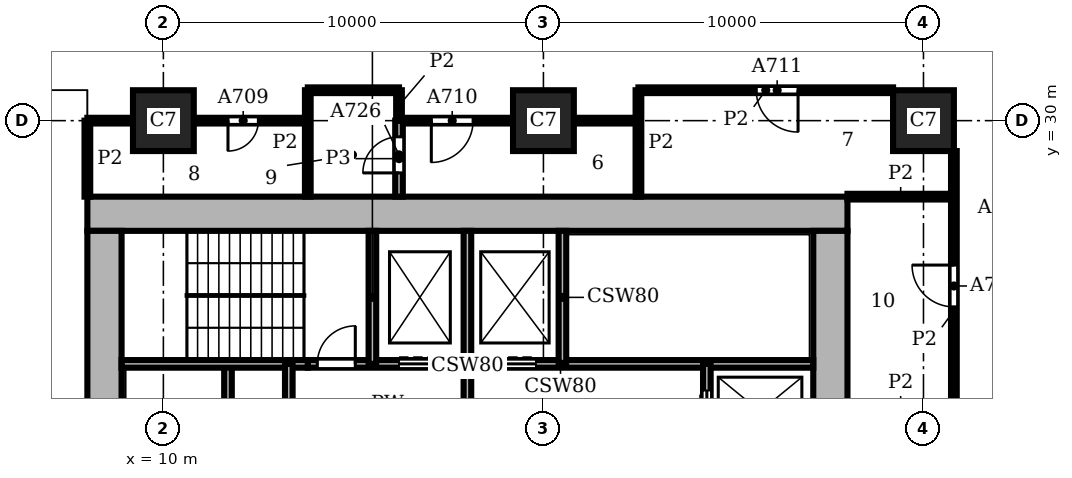
"""IFC4 building model, lengths in metres.
Left out: names, types, materials, properties, quantities, classifications, styles, units other than length and angle.
Written with IfcOpenShell. Run it as: python <this file> out.ifc"""

import sys

from ifc_helpers import new_model, si_unit, direction, frame, frame_2d, origin, origin_2d, place, context, subcontext, project, spatial, rectangle, extrude, element, fill, save


model = new_model("IFC4")
c1 = context("Model", 3, precision=1e-05, world=origin(), true_north=direction((0.0, 1.0)))
c2 = subcontext(c1, "Body", "Model", "MODEL_VIEW")
j1 = project(units=[si_unit("LENGTHUNIT", "METRE"), si_unit("PLANEANGLEUNIT", "RADIAN")], contexts=[c1])
p1 = place(None, origin())
s1 = spatial("IfcSite", under=j1, at=p1, CompositionType="ELEMENT")
p2 = place(p1, origin())
s2 = spatial("IfcBuilding", under=s1, at=p2, CompositionType="ELEMENT")
p3 = place(p2, frame((0.0, 0.0, 82.2)))
s3 = spatial("IfcBuildingStorey", under=s2, at=p3, CompositionType="ELEMENT", Elevation=82.2)
for number, where, z_axis, x_axis in (
    (1, (10.0, 30.0, 0.0), (0.0, 0.0, 1.0), (1.0, 0.0, 0.0)),
    (2, (20.0, 30.0, 0.0), (0.0, 0.0, 1.0), (1.0, 0.0, 0.0)),
    (3, (30.0, 30.0, 0.0), (0.0, 0.0, 1.0), (1.0, 0.0, 0.0)),
):
    element("IfcColumn", number, at=place(p3, frame(where, z_axis=z_axis, x_axis=x_axis)), inside=s3, PredefinedType="COLUMN", context=c2, shape_type="SweptSolid", body=[
        extrude(rectangle(XDim=1.6, YDim=1.6, at=origin_2d()), origin(), (0.0, 0.0, 1.0), 3.9),
    ])
p4 = place(p3, frame((27.55, 8.9, 0.0), z_axis=(0.0, 0.0, 1.0), x_axis=(0.0, 1.0, 0.0)))
e4 = element("IfcWall", 4, at=p4, inside=s3, PredefinedType="SHEAR", context=c2, shape_type="SweptSolid", body=[
    extrude(rectangle(XDim=18.2, YDim=0.9, at=frame_2d((9.1, 0.0))), origin(), (0.0, 0.0, 1.0), 3.9),
])
p5 = place(p4, frame((4.55, 0.0, 0.0)))
e5 = element("IfcOpeningElement", 5, at=p5, cuts=e4, PredefinedType="OPENING", context=c2, shape_type="SweptSolid", body=[
    extrude(rectangle(XDim=1.6, YDim=2.1, at=frame_2d((0.8, 1.05))), frame((0.0, 0.46, 0.0), z_axis=(0.0, -1.0, 0.0), x_axis=(1.0, 0.0, 0.0)), (0.0, 0.0, 1.0), 0.92),
])
p6 = place(p3, frame((28.0, 27.55, 0.0), z_axis=(0.0, 0.0, 1.0), x_axis=(-1.0, 0.0, 0.0)))
e6 = element("IfcWall", 6, at=p6, inside=s3, PredefinedType="SHEAR", context=c2, shape_type="SweptSolid", body=[
    extrude(rectangle(XDim=20.0, YDim=0.9, at=frame_2d((10.0, 0.0))), origin(), (0.0, 0.0, 1.0), 3.9),
])
p7 = place(p3, frame((8.45, 27.1, 0.0), z_axis=(0.0, 0.0, 1.0), x_axis=(0.0, -1.0, 0.0)))
e7 = element("IfcWall", 7, at=p7, inside=s3, PredefinedType="SHEAR", context=c2, shape_type="SweptSolid", body=[
    extrude(rectangle(XDim=18.2, YDim=0.9, at=frame_2d((9.1, 0.0))), origin(), (0.0, 0.0, 1.0), 3.9),
])
p8 = place(p3, frame((8.9, 23.6, 0.0), z_axis=(0.0, 0.0, 1.0), x_axis=(1.0, 0.0, 0.0)))
e8 = element("IfcWall", 8, at=p8, inside=s3, PredefinedType="SHEAR", context=c2, shape_type="SweptSolid", body=[
    extrude(rectangle(XDim=4.9, YDim=0.2, at=frame_2d((2.45, 0.0))), origin(), (0.0, 0.0, 1.0), 3.58),
])
p9 = place(p3, frame((13.8, 23.6, 0.0), z_axis=(0.0, 0.0, 1.0), x_axis=(1.0, 0.0, 0.0)))
e9 = element("IfcWall", 9, at=p9, inside=s3, PredefinedType="SHEAR", context=c2, shape_type="SweptSolid", body=[
    extrude(rectangle(XDim=13.3, YDim=0.2, at=frame_2d((6.65, 0.0))), origin(), (0.0, 0.0, 1.0), 3.58),
])
p10 = place(p9, frame((2.4, 0.0, 0.0)))
e10 = element("IfcOpeningElement", 10, at=p10, cuts=e9, PredefinedType="OPENING", context=c2, shape_type="SweptSolid", body=[
    extrude(rectangle(XDim=1.1, YDim=2.1, at=frame_2d((0.55, 1.05))), frame((0.0, 0.11, 0.0), z_axis=(0.0, -1.0, 0.0), x_axis=(1.0, 0.0, 0.0)), (0.0, 0.0, 1.0), 0.22),
])
p11 = place(p9, frame((4.9, 0.0, 0.0)))
e11 = element("IfcOpeningElement", 11, at=p11, cuts=e9, PredefinedType="OPENING", context=c2, shape_type="SweptSolid", body=[
    extrude(rectangle(XDim=1.1, YDim=2.1, at=frame_2d((0.55, 1.05))), frame((0.0, 0.11, 0.0), z_axis=(0.0, -1.0, 0.0), x_axis=(1.0, 0.0, 0.0)), (0.0, 0.0, 1.0), 0.22),
])
p12 = place(p9, frame((0.25, 0.0, 0.0)))
e12 = element("IfcOpeningElement", 12, at=p12, cuts=e9, PredefinedType="OPENING", context=c2, shape_type="SweptSolid", body=[
    extrude(rectangle(XDim=1.0, YDim=2.1, at=frame_2d((0.5, 1.05))), frame((0.0, 0.11, 0.0), z_axis=(0.0, -1.0, 0.0), x_axis=(1.0, 0.0, 0.0)), (0.0, 0.0, 1.0), 0.22),
])
p13 = place(p3, frame((11.7, 12.4, 0.0), z_axis=(0.0, 0.0, 1.0), x_axis=(0.0, 1.0, 0.0)))
e13 = element("IfcWall", 13, at=p13, inside=s3, PredefinedType="SHEAR", context=c2, shape_type="SweptSolid", body=[
    extrude(rectangle(XDim=11.2, YDim=0.2, at=frame_2d((5.6, 0.0))), origin(), (0.0, 0.0, 1.0), 3.58),
])
p14 = place(p13, frame((0.7, 0.0, 0.0)))
e14 = element("IfcOpeningElement", 14, at=p14, cuts=e13, PredefinedType="OPENING", context=c2, shape_type="SweptSolid", body=[
    extrude(rectangle(XDim=1.1, YDim=2.1, at=frame_2d((0.55, 1.05))), frame((0.0, 0.11, 0.0), z_axis=(0.0, -1.0, 0.0), x_axis=(1.0, 0.0, 0.0)), (0.0, 0.0, 1.0), 0.22),
])
p15 = place(p13, frame((3.2, 0.0, 0.0)))
e15 = element("IfcOpeningElement", 15, at=p15, cuts=e13, PredefinedType="OPENING", context=c2, shape_type="SweptSolid", body=[
    extrude(rectangle(XDim=1.1, YDim=2.1, at=frame_2d((0.55, 1.05))), frame((0.0, 0.11, 0.0), z_axis=(0.0, -1.0, 0.0), x_axis=(1.0, 0.0, 0.0)), (0.0, 0.0, 1.0), 0.22),
])
p16 = place(p13, frame((5.7, 0.0, 0.0)))
e16 = element("IfcOpeningElement", 16, at=p16, cuts=e13, PredefinedType="OPENING", context=c2, shape_type="SweptSolid", body=[
    extrude(rectangle(XDim=1.1, YDim=2.1, at=frame_2d((0.55, 1.05))), frame((0.0, 0.11, 0.0), z_axis=(0.0, -1.0, 0.0), x_axis=(1.0, 0.0, 0.0)), (0.0, 0.0, 1.0), 0.22),
])
p17 = place(p13, frame((8.2, 0.0, 0.0)))
e17 = element("IfcOpeningElement", 17, at=p17, cuts=e13, PredefinedType="OPENING", context=c2, shape_type="SweptSolid", body=[
    extrude(rectangle(XDim=1.1, YDim=2.1, at=frame_2d((0.55, 1.05))), frame((0.0, 0.11, 0.0), z_axis=(0.0, -1.0, 0.0), x_axis=(1.0, 0.0, 0.0)), (0.0, 0.0, 1.0), 0.22),
])
p18 = place(p3, frame((13.3, 20.0, 0.0), z_axis=(0.0, 0.0, 1.0), x_axis=(0.0, 1.0, 0.0)))
e18 = element("IfcWall", 18, at=p18, inside=s3, PredefinedType="SHEAR", context=c2, shape_type="SweptSolid", body=[
    extrude(rectangle(XDim=3.6, YDim=0.2, at=frame_2d((1.8, 0.0))), origin(), (0.0, 0.0, 1.0), 3.58),
])
p19 = place(p3, frame((15.5, 23.6, 0.0), z_axis=(0.0, 0.0, 1.0), x_axis=(0.0, 1.0, 0.0)))
e19 = element("IfcWall", 19, at=p19, inside=s3, PredefinedType="SHEAR", context=c2, shape_type="SweptSolid", body=[
    extrude(rectangle(XDim=3.5, YDim=0.2, at=frame_2d((1.75, 0.0))), origin(), (0.0, 0.0, 1.0), 3.58),
])
p20 = place(p3, frame((18.0, 20.0, 0.0), z_axis=(0.0, 0.0, 1.0), x_axis=(0.0, 1.0, 0.0)))
e20 = element("IfcWall", 20, at=p20, inside=s3, PredefinedType="SHEAR", context=c2, shape_type="SweptSolid", body=[
    extrude(rectangle(XDim=7.1, YDim=0.2, at=frame_2d((3.55, 0.0))), origin(), (0.0, 0.0, 1.0), 3.58),
])
p21 = place(p20, frame((1.2, 0.0, 0.0)))
e21 = element("IfcOpeningElement", 21, at=p21, cuts=e20, PredefinedType="OPENING", context=c2, shape_type="SweptSolid", body=[
    extrude(rectangle(XDim=1.2, YDim=2.1, at=frame_2d((0.6, 1.05))), frame((0.0, 0.11, 0.0), z_axis=(0.0, -1.0, 0.0), x_axis=(1.0, 0.0, 0.0)), (0.0, 0.0, 1.0), 0.22),
])
p22 = place(p3, frame((20.5, 23.6, 0.0), z_axis=(0.0, 0.0, 1.0), x_axis=(0.0, 1.0, 0.0)))
e22 = element("IfcWall", 22, at=p22, inside=s3, PredefinedType="SHEAR", context=c2, shape_type="SweptSolid", body=[
    extrude(rectangle(XDim=3.5, YDim=0.2, at=frame_2d((1.75, 0.0))), origin(), (0.0, 0.0, 1.0), 3.58),
])
p23 = place(p3, frame((24.3, 16.1, 0.0), z_axis=(0.0, 0.0, 1.0), x_axis=(0.0, 1.0, 0.0)))
e23 = element("IfcWall", 23, at=p23, inside=s3, PredefinedType="SHEAR", context=c2, shape_type="SweptSolid", body=[
    extrude(rectangle(XDim=7.5, YDim=0.2, at=frame_2d((3.75, 0.0))), origin(), (0.0, 0.0, 1.0), 3.58),
])
p24 = place(p23, frame((5.7, 0.0, 0.0)))
e24 = element("IfcOpeningElement", 24, at=p24, cuts=e23, PredefinedType="OPENING", context=c2, shape_type="SweptSolid", body=[
    extrude(rectangle(XDim=1.1, YDim=2.1, at=frame_2d((0.55, 1.05))), frame((0.0, 0.11, 0.0), z_axis=(0.0, -1.0, 0.0), x_axis=(1.0, 0.0, 0.0)), (0.0, 0.0, 1.0), 0.22),
])
p25 = place(p3, frame((8.0, 28.0, 0.0), z_axis=(0.0, 0.0, 1.0), x_axis=(0.0, 1.0, 0.0)))
e25 = element("IfcWall", 25, at=p25, inside=s3, PredefinedType="PARTITIONING", context=c2, shape_type="SweptSolid", body=[
    extrude(rectangle(XDim=2.0, YDim=0.15, at=frame_2d((1.0, 0.0))), origin(), (0.0, 0.0, 1.0), 3.58),
])
p26 = place(p3, frame((13.8, 28.0, 0.0), z_axis=(0.0, 0.0, 1.0), x_axis=(0.0, 1.0, 0.0)))
e26 = element("IfcWall", 26, at=p26, inside=s3, PredefinedType="PARTITIONING", context=c2, shape_type="SweptSolid", body=[
    extrude(rectangle(XDim=2.8, YDim=0.15, at=frame_2d((1.4, 0.0))), origin(), (0.0, 0.0, 1.0), 3.58),
])
p27 = place(p3, frame((16.2, 30.0, 0.0), z_axis=(0.0, 0.0, 1.0), x_axis=(0.0, 1.0, 0.0)))
e27 = element("IfcWall", 27, at=p27, inside=s3, PredefinedType="PARTITIONING", context=c2, shape_type="SweptSolid", body=[
    extrude(rectangle(XDim=0.8, YDim=0.15, at=frame_2d((0.4, 0.0))), origin(), (0.0, 0.0, 1.0), 3.58),
])
p28 = place(p3, frame((22.5, 28.0, 0.0), z_axis=(0.0, 0.0, 1.0), x_axis=(0.0, 1.0, 0.0)))
e28 = element("IfcWall", 28, at=p28, inside=s3, PredefinedType="PARTITIONING", context=c2, shape_type="SweptSolid", body=[
    extrude(rectangle(XDim=2.8, YDim=0.15, at=frame_2d((1.4, 0.0))), origin(), (0.0, 0.0, 1.0), 3.58),
])
p29 = place(p3, frame((30.8, 20.8, 0.0), z_axis=(0.0, 0.0, 1.0), x_axis=(0.0, 1.0, 0.0)))
e29 = element("IfcWall", 29, at=p29, inside=s3, PredefinedType="PARTITIONING", context=c2, shape_type="SweptSolid", body=[
    extrude(rectangle(XDim=8.4, YDim=0.15, at=frame_2d((4.2, 0.0))), origin(), (0.0, 0.0, 1.0), 3.58),
])
p30 = place(p29, frame((4.3, 0.0, 0.0)))
e30 = element("IfcOpeningElement", 30, at=p30, cuts=e29, PredefinedType="OPENING", context=c2, shape_type="SweptSolid", body=[
    extrude(rectangle(XDim=1.1, YDim=2.1, at=frame_2d((0.55, 1.05))), frame((0.0, 0.085, 0.0), z_axis=(0.0, -1.0, 0.0), x_axis=(1.0, 0.0, 0.0)), (0.0, 0.0, 1.0), 0.17),
])
p31 = place(p3, frame((28.0, 28.0, 0.0), z_axis=(0.0, 0.0, 1.0), x_axis=(1.0, 0.0, 0.0)))
e31 = element("IfcWall", 31, at=p31, inside=s3, PredefinedType="PARTITIONING", context=c2, shape_type="SweptSolid", body=[
    extrude(rectangle(XDim=2.8, YDim=0.15, at=frame_2d((1.4, 0.0))), origin(), (0.0, 0.0, 1.0), 3.58),
])
p32 = place(p3, frame((8.0, 30.0, 0.0), z_axis=(0.0, 0.0, 1.0), x_axis=(1.0, 0.0, 0.0)))
e32 = element("IfcWall", 32, at=p32, inside=s3, PredefinedType="PARTITIONING", context=c2, shape_type="SweptSolid", body=[
    extrude(rectangle(XDim=1.2, YDim=0.15, at=frame_2d((0.6, 0.0))), origin(), (0.0, 0.0, 1.0), 3.58),
])
p33 = place(p3, frame((10.8, 30.0, 0.0), z_axis=(0.0, 0.0, 1.0), x_axis=(1.0, 0.0, 0.0)))
e33 = element("IfcWall", 33, at=p33, inside=s3, PredefinedType="PARTITIONING", context=c2, shape_type="SweptSolid", body=[
    extrude(rectangle(XDim=3.0, YDim=0.15, at=frame_2d((1.5, 0.0))), origin(), (0.0, 0.0, 1.0), 3.58),
])
p34 = place(p33, frame((0.9, 0.0, 0.0)))
e34 = element("IfcOpeningElement", 34, at=p34, cuts=e33, PredefinedType="OPENING", context=c2, shape_type="SweptSolid", body=[
    extrude(rectangle(XDim=0.8, YDim=2.1, at=frame_2d((0.4, 1.05))), frame((0.0, 0.085, 0.0), z_axis=(0.0, -1.0, 0.0), x_axis=(1.0, 0.0, 0.0)), (0.0, 0.0, 1.0), 0.17),
])
p35 = place(p3, frame((16.2, 30.0, 0.0), z_axis=(0.0, 0.0, 1.0), x_axis=(1.0, 0.0, 0.0)))
e35 = element("IfcWall", 35, at=p35, inside=s3, PredefinedType="PARTITIONING", context=c2, shape_type="SweptSolid", body=[
    extrude(rectangle(XDim=3.0, YDim=0.15, at=frame_2d((1.5, 0.0))), origin(), (0.0, 0.0, 1.0), 3.58),
])
p36 = place(p35, frame((0.85, 0.0, 0.0)))
e36 = element("IfcOpeningElement", 36, at=p36, cuts=e35, PredefinedType="OPENING", context=c2, shape_type="SweptSolid", body=[
    extrude(rectangle(XDim=1.1, YDim=2.1, at=frame_2d((0.55, 1.05))), frame((0.0, 0.085, 0.0), z_axis=(0.0, -1.0, 0.0), x_axis=(1.0, 0.0, 0.0)), (0.0, 0.0, 1.0), 0.17),
])
p37 = place(p3, frame((20.8, 30.0, 0.0), z_axis=(0.0, 0.0, 1.0), x_axis=(1.0, 0.0, 0.0)))
e37 = element("IfcWall", 37, at=p37, inside=s3, PredefinedType="PARTITIONING", context=c2, shape_type="SweptSolid", body=[
    extrude(rectangle(XDim=1.7, YDim=0.15, at=frame_2d((0.85, 0.0))), origin(), (0.0, 0.0, 1.0), 3.58),
])
p38 = place(p3, frame((13.8, 30.8, 0.0), z_axis=(0.0, 0.0, 1.0), x_axis=(1.0, 0.0, 0.0)))
e38 = element("IfcWall", 38, at=p38, inside=s3, PredefinedType="PARTITIONING", context=c2, shape_type="SweptSolid", body=[
    extrude(rectangle(XDim=2.4, YDim=0.15, at=frame_2d((1.2, 0.0))), origin(), (0.0, 0.0, 1.0), 3.58),
])
p39 = place(p3, frame((22.5, 30.8, 0.0), z_axis=(0.0, 0.0, 1.0), x_axis=(1.0, 0.0, 0.0)))
e39 = element("IfcWall", 39, at=p39, inside=s3, PredefinedType="PARTITIONING", context=c2, shape_type="SweptSolid", body=[
    extrude(rectangle(XDim=6.7, YDim=0.15, at=frame_2d((3.35, 0.0))), origin(), (0.0, 0.0, 1.0), 3.58),
])
p40 = place(p39, frame((3.1, 0.0, 0.0)))
e40 = element("IfcOpeningElement", 40, at=p40, cuts=e39, PredefinedType="OPENING", context=c2, shape_type="SweptSolid", body=[
    extrude(rectangle(XDim=1.1, YDim=2.1, at=frame_2d((0.55, 1.05))), frame((0.0, 0.085, 0.0), z_axis=(0.0, -1.0, 0.0), x_axis=(1.0, 0.0, 0.0)), (0.0, 0.0, 1.0), 0.17),
])
p41 = place(p3, frame((16.2, 28.0, 0.0), z_axis=(0.0, 0.0, 1.0), x_axis=(0.0, 1.0, 0.0)))
e41 = element("IfcWall", 41, at=p41, inside=s3, PredefinedType="PARTITIONING", context=c2, shape_type="SweptSolid", body=[
    extrude(rectangle(XDim=2.0, YDim=0.2, at=frame_2d((1.0, 0.0))), origin(), (0.0, 0.0, 1.0), 3.58),
])
p42 = place(p41, frame((0.625, 0.0, 0.0)))
e42 = element("IfcOpeningElement", 42, at=p42, cuts=e41, PredefinedType="OPENING", context=c2, shape_type="SweptSolid", body=[
    extrude(rectangle(XDim=0.95, YDim=2.1, at=frame_2d((0.475, 1.05))), frame((0.0, 0.11, 0.0), z_axis=(0.0, -1.0, 0.0), x_axis=(1.0, 0.0, 0.0)), (0.0, 0.0, 1.0), 0.22),
])
p43 = place(p24, origin())
e43 = element("IfcDoor", 43, at=p43, inside=s3, OperationType="DOUBLE_DOOR_SLIDING", PredefinedType="DOOR", context=c2, shape_type="SweptSolid", body=[
    extrude(rectangle(XDim=1.1, YDim=2.1, at=frame_2d((0.55, 1.05))), frame((0.0, 0.025, 0.0), z_axis=(0.0, -1.0, 0.0), x_axis=(1.0, 0.0, 0.0)), (0.0, 0.0, 1.0), 0.05),
])
fill(e24, e43)
p44 = place(p10, origin())
e44 = element("IfcDoor", 44, at=p44, inside=s3, OperationType="DOUBLE_DOOR_SLIDING", PredefinedType="DOOR", context=c2, shape_type="SweptSolid", body=[
    extrude(rectangle(XDim=1.1, YDim=2.1, at=frame_2d((0.55, 1.05))), frame((0.0, 0.025, 0.0), z_axis=(0.0, -1.0, 0.0), x_axis=(1.0, 0.0, 0.0)), (0.0, 0.0, 1.0), 0.05),
])
fill(e10, e44)
p45 = place(p11, origin())
e45 = element("IfcDoor", 45, at=p45, inside=s3, OperationType="DOUBLE_DOOR_SLIDING", PredefinedType="DOOR", context=c2, shape_type="SweptSolid", body=[
    extrude(rectangle(XDim=1.1, YDim=2.1, at=frame_2d((0.55, 1.05))), frame((0.0, 0.025, 0.0), z_axis=(0.0, -1.0, 0.0), x_axis=(1.0, 0.0, 0.0)), (0.0, 0.0, 1.0), 0.05),
])
fill(e11, e45)
p46 = place(p12, origin())
e46 = element("IfcDoor", 46, at=p46, inside=s3, OperationType="SINGLE_SWING_RIGHT", PredefinedType="DOOR", context=c2, shape_type="SweptSolid", body=[
    extrude(rectangle(XDim=1.0, YDim=2.1, at=frame_2d((0.5, 1.05))), frame((0.0, 0.025, 0.0), z_axis=(0.0, -1.0, 0.0), x_axis=(1.0, 0.0, 0.0)), (0.0, 0.0, 1.0), 0.05),
])
fill(e12, e46)
p47 = place(p30, origin())
e47 = element("IfcDoor", 47, at=p47, inside=s3, OperationType="SINGLE_SWING_RIGHT", PredefinedType="DOOR", context=c2, shape_type="SweptSolid", body=[
    extrude(rectangle(XDim=1.1, YDim=2.1, at=frame_2d((0.55, 1.05))), frame((0.0, 0.025, 0.0), z_axis=(0.0, -1.0, 0.0), x_axis=(1.0, 0.0, 0.0)), (0.0, 0.0, 1.0), 0.05),
])
fill(e30, e47)
p48 = place(p34, frame((0.8, 0.0, 0.0), z_axis=(0.0, 0.0, 1.0), x_axis=(-1.0, 0.0, 0.0)))
e48 = element("IfcDoor", 48, at=p48, inside=s3, OperationType="SINGLE_SWING_RIGHT", PredefinedType="DOOR", context=c2, shape_type="SweptSolid", body=[
    extrude(rectangle(XDim=0.8, YDim=2.1, at=frame_2d((0.4, 1.05))), frame((0.0, 0.025, 0.0), z_axis=(0.0, -1.0, 0.0), x_axis=(1.0, 0.0, 0.0)), (0.0, 0.0, 1.0), 0.05),
])
fill(e34, e48)
p49 = place(p36, frame((1.1, 0.0, 0.0), z_axis=(0.0, 0.0, 1.0), x_axis=(-1.0, 0.0, 0.0)))
e49 = element("IfcDoor", 49, at=p49, inside=s3, OperationType="SINGLE_SWING_RIGHT", PredefinedType="DOOR", context=c2, shape_type="SweptSolid", body=[
    extrude(rectangle(XDim=1.1, YDim=2.1, at=frame_2d((0.55, 1.05))), frame((0.0, 0.025, 0.0), z_axis=(0.0, -1.0, 0.0), x_axis=(1.0, 0.0, 0.0)), (0.0, 0.0, 1.0), 0.05),
])
fill(e36, e49)
p50 = place(p40, frame((1.1, 0.0, 0.0), z_axis=(0.0, 0.0, 1.0), x_axis=(-1.0, 0.0, 0.0)))
e50 = element("IfcDoor", 50, at=p50, inside=s3, OperationType="SINGLE_SWING_LEFT", PredefinedType="DOOR", context=c2, shape_type="SweptSolid", body=[
    extrude(rectangle(XDim=1.1, YDim=2.1, at=frame_2d((0.55, 1.05))), frame((0.0, 0.025, 0.0), z_axis=(0.0, -1.0, 0.0), x_axis=(1.0, 0.0, 0.0)), (0.0, 0.0, 1.0), 0.05),
])
fill(e40, e50)
p51 = place(p42, origin())
e51 = element("IfcDoor", 51, at=p51, inside=s3, OperationType="SINGLE_SWING_LEFT", PredefinedType="DOOR", context=c2, shape_type="SweptSolid", body=[
    extrude(rectangle(XDim=0.95, YDim=2.1, at=frame_2d((0.475, 1.05))), frame((0.0, 0.025, 0.0), z_axis=(0.0, -1.0, 0.0), x_axis=(1.0, 0.0, 0.0)), (0.0, 0.0, 1.0), 0.05),
])
fill(e42, e51)
save(model, sys.argv[1])
